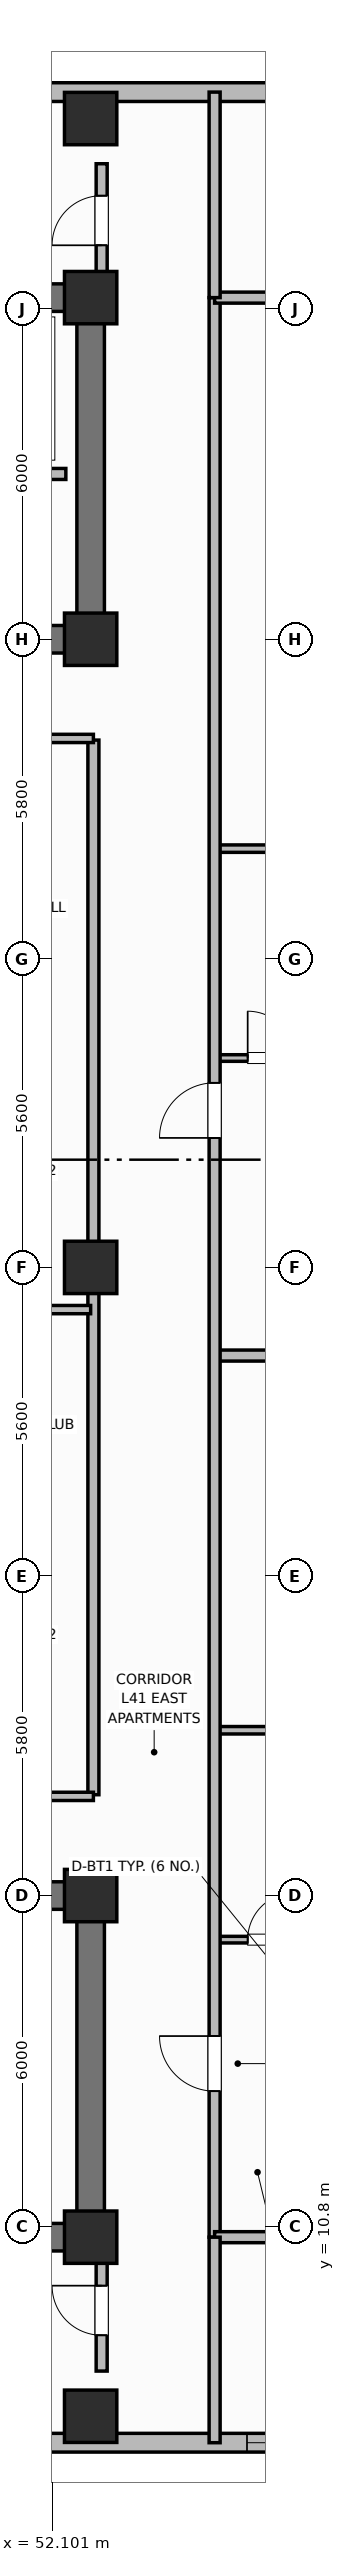
"""IFC4 building model, lengths in metres.
Left out: names, types, materials, properties, quantities, classifications, styles, units other than length and angle.
Written with IfcOpenShell. Run it as: python <this file> out.ifc"""

import sys

from ifc_helpers import new_model, si_unit, direction, frame, frame_2d, origin, origin_2d, place, context, subcontext, project, spatial, rectangle, extrude, element, fill, save


model = new_model("IFC4")
c1 = context("Model", 3, precision=1e-05, world=origin(), true_north=direction((0.0, 1.0)))
c2 = subcontext(c1, "Body", "Model", "MODEL_VIEW")
j1 = project(units=[si_unit("LENGTHUNIT", "METRE"), si_unit("PLANEANGLEUNIT", "RADIAN")], contexts=[c1])
p1 = place(None, origin())
s1 = spatial("IfcSite", under=j1, at=p1, CompositionType="ELEMENT")
p2 = place(p1, origin())
s2 = spatial("IfcBuilding", under=s1, at=p2, CompositionType="ELEMENT")
p3 = place(p2, frame((0.0, 0.0, 166.3)))
s3 = spatial("IfcBuildingStorey", under=s2, at=p3, CompositionType="ELEMENT", Elevation=166.3)
p4 = place(p3, frame((52.8, 10.6, 0.0), z_axis=(0.0, 0.0, 1.0), x_axis=(-1.0, 0.0, 0.0)))
e1 = element("IfcWall", 1, at=p4, inside=s3, PredefinedType="SHEAR", context=c2, shape_type="SweptSolid", body=[
    extrude(rectangle(XDim=27.2, YDim=0.5, at=frame_2d((13.6, 0.0))), origin(), (0.0, 0.0, 1.0), 3.7),
])
p5 = place(p3, frame((52.8, 10.85, 0.0), z_axis=(0.0, 0.0, 1.0), x_axis=(0.0, 1.0, 0.0)))
e2 = element("IfcWall", 2, at=p5, inside=s3, PredefinedType="SHEAR", context=c2, shape_type="SweptSolid", body=[
    extrude(rectangle(XDim=5.7, YDim=0.5, at=frame_2d((2.85, 0.0))), origin(), (0.0, 0.0, 1.0), 3.7),
])
p6 = place(p3, frame((25.6, 16.8, 0.0), z_axis=(0.0, 0.0, 1.0), x_axis=(1.0, 0.0, 0.0)))
e3 = element("IfcWall", 3, at=p6, inside=s3, PredefinedType="SHEAR", context=c2, shape_type="SweptSolid", body=[
    extrude(rectangle(XDim=27.2, YDim=0.5, at=frame_2d((13.6, 0.0))), origin(), (0.0, 0.0, 1.0), 3.7),
])
p7 = place(p6, frame((1.8, 0.0, 0.0)))
e4 = element("IfcOpeningElement", 4, at=p7, cuts=e3, PredefinedType="OPENING", context=c2, shape_type="SweptSolid", body=[
    extrude(rectangle(XDim=1.1, YDim=2.15, at=frame_2d((0.55, 1.075))), frame((0.0, 0.26, 0.0), z_axis=(0.0, -1.0, 0.0), x_axis=(1.0, 0.0, 0.0)), (0.0, 0.0, 1.0), 0.52),
])
p8 = place(p6, frame((5.6, 0.0, 0.0)))
e5 = element("IfcOpeningElement", 5, at=p8, cuts=e3, PredefinedType="OPENING", context=c2, shape_type="SweptSolid", body=[
    extrude(rectangle(XDim=0.85, YDim=2.1, at=frame_2d((0.425, 1.05))), frame((0.0, 0.26, 0.0), z_axis=(0.0, -1.0, 0.0), x_axis=(1.0, 0.0, 0.0)), (0.0, 0.0, 1.0), 0.52),
])
p9 = place(p6, frame((13.0, 0.0, 0.0)))
e6 = element("IfcOpeningElement", 6, at=p9, cuts=e3, PredefinedType="OPENING", context=c2, shape_type="SweptSolid", body=[
    extrude(rectangle(XDim=1.2, YDim=2.15, at=frame_2d((0.6, 1.075))), frame((0.0, 0.26, 0.0), z_axis=(0.0, -1.0, 0.0), x_axis=(1.0, 0.0, 0.0)), (0.0, 0.0, 1.0), 0.52),
])
p10 = place(p6, frame((19.2, 0.0, 0.0)))
e7 = element("IfcOpeningElement", 7, at=p10, cuts=e3, PredefinedType="OPENING", context=c2, shape_type="SweptSolid", body=[
    extrude(rectangle(XDim=0.85, YDim=2.1, at=frame_2d((0.425, 1.05))), frame((0.0, 0.26, 0.0), z_axis=(0.0, -1.0, 0.0), x_axis=(1.0, 0.0, 0.0)), (0.0, 0.0, 1.0), 0.52),
])
p11 = place(p6, frame((23.8, 0.0, 0.0)))
e8 = element("IfcOpeningElement", 8, at=p11, cuts=e3, PredefinedType="OPENING", context=c2, shape_type="SweptSolid", body=[
    extrude(rectangle(XDim=0.9, YDim=2.1, at=frame_2d((0.45, 1.05))), frame((0.0, 0.26, 0.0), z_axis=(0.0, -1.0, 0.0), x_axis=(1.0, 0.0, 0.0)), (0.0, 0.0, 1.0), 0.52),
])
p12 = place(p3, frame((25.6, 45.8, 0.0), z_axis=(0.0, 0.0, 1.0), x_axis=(1.0, 0.0, 0.0)))
e9 = element("IfcWall", 9, at=p12, inside=s3, PredefinedType="SHEAR", context=c2, shape_type="SweptSolid", body=[
    extrude(rectangle(XDim=27.2, YDim=0.5, at=frame_2d((13.6, 0.0))), origin(), (0.0, 0.0, 1.0), 3.7),
])
p13 = place(p3, frame((52.8, 39.85, 0.0), z_axis=(0.0, 0.0, 1.0), x_axis=(0.0, 1.0, 0.0)))
e10 = element("IfcWall", 10, at=p13, inside=s3, PredefinedType="SHEAR", context=c2, shape_type="SweptSolid", body=[
    extrude(rectangle(XDim=5.7, YDim=0.5, at=frame_2d((2.85, 0.0))), origin(), (0.0, 0.0, 1.0), 3.7),
])
p14 = place(p3, frame((52.8, 39.6, 0.0), z_axis=(0.0, 0.0, 1.0), x_axis=(-1.0, 0.0, 0.0)))
e11 = element("IfcWall", 11, at=p14, inside=s3, PredefinedType="SHEAR", context=c2, shape_type="SweptSolid", body=[
    extrude(rectangle(XDim=27.2, YDim=0.5, at=frame_2d((13.6, 0.0))), origin(), (0.0, 0.0, 1.0), 3.7),
])
p15 = place(p14, frame((24.2, 0.0, 0.0)))
e12 = element("IfcOpeningElement", 12, at=p15, cuts=e11, PredefinedType="OPENING", context=c2, shape_type="SweptSolid", body=[
    extrude(rectangle(XDim=1.1, YDim=2.15, at=frame_2d((0.55, 1.075))), frame((0.0, 0.26, 0.0), z_axis=(0.0, -1.0, 0.0), x_axis=(1.0, 0.0, 0.0)), (0.0, 0.0, 1.0), 0.52),
])
p16 = place(p14, frame((20.55, 0.0, 0.0)))
e13 = element("IfcOpeningElement", 13, at=p16, cuts=e11, PredefinedType="OPENING", context=c2, shape_type="SweptSolid", body=[
    extrude(rectangle(XDim=0.95, YDim=2.1, at=frame_2d((0.475, 1.05))), frame((0.0, 0.26, 0.0), z_axis=(0.0, -1.0, 0.0), x_axis=(1.0, 0.0, 0.0)), (0.0, 0.0, 1.0), 0.52),
])
p17 = place(p14, frame((15.1, 0.0, 0.0)))
e14 = element("IfcOpeningElement", 14, at=p17, cuts=e11, PredefinedType="OPENING", context=c2, shape_type="SweptSolid", body=[
    extrude(rectangle(XDim=1.2, YDim=2.15, at=frame_2d((0.6, 1.075))), frame((0.0, 0.26, 0.0), z_axis=(0.0, -1.0, 0.0), x_axis=(1.0, 0.0, 0.0)), (0.0, 0.0, 1.0), 0.52),
])
p18 = place(p14, frame((13.05, 0.0, 0.0)))
e15 = element("IfcOpeningElement", 15, at=p18, cuts=e11, PredefinedType="OPENING", context=c2, shape_type="SweptSolid", body=[
    extrude(rectangle(XDim=0.85, YDim=2.1, at=frame_2d((0.425, 1.05))), frame((0.0, 0.26, 0.0), z_axis=(0.0, -1.0, 0.0), x_axis=(1.0, 0.0, 0.0)), (0.0, 0.0, 1.0), 0.52),
])
p19 = place(p14, frame((11.0, 0.0, 0.0)))
e16 = element("IfcOpeningElement", 16, at=p19, cuts=e11, PredefinedType="OPENING", context=c2, shape_type="SweptSolid", body=[
    extrude(rectangle(XDim=0.85, YDim=2.1, at=frame_2d((0.425, 1.05))), frame((0.0, 0.26, 0.0), z_axis=(0.0, -1.0, 0.0), x_axis=(1.0, 0.0, 0.0)), (0.0, 0.0, 1.0), 0.52),
])
p20 = place(p14, frame((7.35, 0.0, 0.0)))
e17 = element("IfcOpeningElement", 17, at=p20, cuts=e11, PredefinedType="OPENING", context=c2, shape_type="SweptSolid", body=[
    extrude(rectangle(XDim=0.85, YDim=2.1, at=frame_2d((0.425, 1.05))), frame((0.0, 0.26, 0.0), z_axis=(0.0, -1.0, 0.0), x_axis=(1.0, 0.0, 0.0)), (0.0, 0.0, 1.0), 0.52),
])
p21 = place(p14, frame((4.8, 0.0, 0.0)))
e18 = element("IfcOpeningElement", 18, at=p21, cuts=e11, PredefinedType="OPENING", context=c2, shape_type="SweptSolid", body=[
    extrude(rectangle(XDim=0.85, YDim=2.1, at=frame_2d((0.425, 1.05))), frame((0.0, 0.26, 0.0), z_axis=(0.0, -1.0, 0.0), x_axis=(1.0, 0.0, 0.0)), (0.0, 0.0, 1.0), 0.52),
])
p22 = place(p14, frame((1.9, 0.0, 0.0)))
e19 = element("IfcOpeningElement", 19, at=p22, cuts=e11, PredefinedType="OPENING", context=c2, shape_type="SweptSolid", body=[
    extrude(rectangle(XDim=0.85, YDim=2.1, at=frame_2d((0.425, 1.05))), frame((0.0, 0.26, 0.0), z_axis=(0.0, -1.0, 0.0), x_axis=(1.0, 0.0, 0.0)), (0.0, 0.0, 1.0), 0.52),
])
for number, where, z_axis, x_axis in (
    (20, (52.8, 10.6, 0.0), (0.0, 0.0, 1.0), (1.0, 0.0, 0.0)),
    (21, (52.8, 16.8, 0.0), (0.0, 0.0, 1.0), (1.0, 0.0, 0.0)),
    (22, (52.8, 39.6, 0.0), (0.0, 0.0, 1.0), (1.0, 0.0, 0.0)),
    (23, (52.8, 45.8, 0.0), (0.0, 0.0, 1.0), (1.0, 0.0, 0.0)),
    (24, (52.8, 28.2, 0.0), (0.0, 0.0, 1.0), (1.0, 0.0, 0.0)),
    (25, (52.8, 7.35, 0.0), (0.0, 0.0, 1.0), (1.0, 0.0, 0.0)),
    (26, (52.8, 49.05, 0.0), (0.0, 0.0, 1.0), (1.0, 0.0, 0.0)),
):
    element("IfcColumn", number, at=place(p3, frame(where, z_axis=z_axis, x_axis=x_axis)), inside=s3, PredefinedType="COLUMN", context=c2, shape_type="SweptSolid", body=[
        extrude(rectangle(XDim=0.95, YDim=0.95, at=origin_2d()), origin(), (0.0, 0.0, 1.0), 3.7),
    ])
p23 = place(p3, frame((42.4, 6.87, 0.0), z_axis=(0.0, 0.0, 1.0), x_axis=(1.0, 0.0, 0.0)))
e27 = element("IfcWall", 27, at=p23, inside=s3, PredefinedType="SOLIDWALL", context=c2, shape_type="SweptSolid", body=[
    extrude(rectangle(XDim=15.8, YDim=0.34, at=frame_2d((7.9, 0.0))), origin(), (0.0, 0.0, 1.0), 2.72),
])
p24 = place(p23, frame((5.288, 0.0, 0.7)))
e28 = element("IfcOpeningElement", 28, at=p24, cuts=e27, PredefinedType="OPENING", context=c2, shape_type="SweptSolid", body=[
    extrude(rectangle(XDim=1.6, YDim=1.9, at=frame_2d((0.8, 0.95))), frame((0.0, 0.18, 0.0), z_axis=(0.0, -1.0, 0.0), x_axis=(1.0, 0.0, 0.0)), (0.0, 0.0, 1.0), 0.36),
])
p25 = place(p23, frame((13.238, 0.0, 0.7)))
e29 = element("IfcOpeningElement", 29, at=p25, cuts=e27, PredefinedType="OPENING", context=c2, shape_type="SweptSolid", body=[
    extrude(rectangle(XDim=1.6, YDim=1.9, at=frame_2d((0.8, 0.95))), frame((0.0, 0.18, 0.0), z_axis=(0.0, -1.0, 0.0), x_axis=(1.0, 0.0, 0.0)), (0.0, 0.0, 1.0), 0.36),
])
p26 = place(p3, frame((58.2, 49.53, 0.0), z_axis=(0.0, 0.0, 1.0), x_axis=(-1.0, 0.0, 0.0)))
e30 = element("IfcWall", 30, at=p26, inside=s3, PredefinedType="SOLIDWALL", context=c2, shape_type="SweptSolid", body=[
    extrude(rectangle(XDim=15.8, YDim=0.34, at=frame_2d((7.9, 0.0))), origin(), (0.0, 0.0, 1.0), 2.72),
])
p27 = place(p26, frame((8.663, 0.0, 0.7)))
e31 = element("IfcOpeningElement", 31, at=p27, cuts=e30, PredefinedType="OPENING", context=c2, shape_type="SweptSolid", body=[
    extrude(rectangle(XDim=2.1, YDim=1.9, at=frame_2d((1.05, 0.95))), frame((0.0, 0.18, 0.0), z_axis=(0.0, -1.0, 0.0), x_axis=(1.0, 0.0, 0.0)), (0.0, 0.0, 1.0), 0.36),
])
p28 = place(p3, frame((52.35, 42.6, 0.0), z_axis=(0.0, 0.0, 1.0), x_axis=(-1.0, 0.0, 0.0)))
e32 = element("IfcWall", 32, at=p28, inside=s3, PredefinedType="PARTITIONING", context=c2, shape_type="SweptSolid", body=[
    extrude(rectangle(XDim=6.5, YDim=0.2, at=frame_2d((3.25, 0.0))), origin(), (0.0, 0.0, 1.0), 2.55),
])
p29 = place(p3, frame((52.85, 18.63, 0.0), z_axis=(0.0, 0.0, 1.0), x_axis=(0.0, 1.0, 0.0)))
e33 = element("IfcWall", 33, at=p29, inside=s3, PredefinedType="PARTITIONING", context=c2, shape_type="SweptSolid", body=[
    extrude(rectangle(XDim=19.14, YDim=0.2, at=frame_2d((9.57, 0.0))), origin(), (0.0, 0.0, 1.0), 2.55),
])
for number, where, z_axis, x_axis in (
    (34, (50.05, 18.6, 0.0), (0.0, 0.0, 1.0), (1.0, 0.0, 0.0)),
    (35, (50.05, 37.8, 0.0), (0.0, 0.0, 1.0), (1.0, 0.0, 0.0)),
):
    element("IfcWall", number, at=place(p3, frame(where, z_axis=z_axis, x_axis=x_axis)), inside=s3, PredefinedType="PARTITIONING", context=c2, shape_type="SweptSolid", body=[
        extrude(rectangle(XDim=2.8, YDim=0.15, at=frame_2d((1.4, 0.0))), origin(), (0.0, 0.0, 1.0), 2.55),
    ])
p30 = place(p3, frame((50.08, 27.434, 0.0), z_axis=(0.0, 0.0, 1.0), x_axis=(1.0, 0.0, 0.0)))
e36 = element("IfcWall", 36, at=p30, inside=s3, PredefinedType="PARTITIONING", context=c2, shape_type="SweptSolid", body=[
    extrude(rectangle(XDim=2.72, YDim=0.15, at=frame_2d((1.36, 0.0))), origin(), (0.0, 0.0, 1.0), 2.55),
])
p31 = place(p3, frame((55.05, 16.0, 0.0), z_axis=(0.0, 0.0, 1.0), x_axis=(1.0, 0.0, 0.0)))
e37 = element("IfcWall", 37, at=p31, inside=s3, PredefinedType="PARTITIONING", context=c2, shape_type="SweptSolid", body=[
    extrude(rectangle(XDim=2.25, YDim=0.12, at=frame_2d((1.125, 0.0))), origin(), (0.0, 0.0, 1.0), 2.55),
])
p32 = place(p31, frame((0.6, 0.0, 0.0)))
e38 = element("IfcOpeningElement", 38, at=p32, cuts=e37, PredefinedType="OPENING", context=c2, shape_type="SweptSolid", body=[
    extrude(rectangle(XDim=0.85, YDim=2.1, at=frame_2d((0.425, 1.05))), frame((0.0, 0.07, 0.0), z_axis=(0.0, -1.0, 0.0), x_axis=(1.0, 0.0, 0.0)), (0.0, 0.0, 1.0), 0.14),
])
p33 = place(p3, frame((55.05, 19.8, 0.0), z_axis=(0.0, 0.0, 1.0), x_axis=(1.0, 0.0, 0.0)))
e39 = element("IfcWall", 39, at=p33, inside=s3, PredefinedType="PARTITIONING", context=c2, shape_type="SweptSolid", body=[
    extrude(rectangle(XDim=2.25, YDim=0.135, at=frame_2d((1.125, 0.0))), origin(), (0.0, 0.0, 1.0), 2.55),
])
p34 = place(p3, frame((55.05, 26.6, 0.0), z_axis=(0.0, 0.0, 1.0), x_axis=(1.0, 0.0, 0.0)))
e40 = element("IfcWall", 40, at=p34, inside=s3, PredefinedType="PARTITIONING", context=c2, shape_type="SweptSolid", body=[
    extrude(rectangle(XDim=6.066, YDim=0.2, at=frame_2d((3.033, 0.0))), origin(), (0.0, 0.0, 1.0), 2.55),
])
p35 = place(p3, frame((55.05, 32.0, 0.0), z_axis=(0.0, 0.0, 1.0), x_axis=(1.0, 0.0, 0.0)))
e41 = element("IfcWall", 41, at=p35, inside=s3, PredefinedType="PARTITIONING", context=c2, shape_type="SweptSolid", body=[
    extrude(rectangle(XDim=2.25, YDim=0.12, at=frame_2d((1.125, 0.0))), origin(), (0.0, 0.0, 1.0), 2.55),
])
p36 = place(p35, frame((0.6, 0.0, 0.0)))
e42 = element("IfcOpeningElement", 42, at=p36, cuts=e41, PredefinedType="OPENING", context=c2, shape_type="SweptSolid", body=[
    extrude(rectangle(XDim=0.85, YDim=2.1, at=frame_2d((0.425, 1.05))), frame((0.0, 0.07, 0.0), z_axis=(0.0, -1.0, 0.0), x_axis=(1.0, 0.0, 0.0)), (0.0, 0.0, 1.0), 0.14),
])
p37 = place(p3, frame((55.05, 35.8, 0.0), z_axis=(0.0, 0.0, 1.0), x_axis=(1.0, 0.0, 0.0)))
e43 = element("IfcWall", 43, at=p37, inside=s3, PredefinedType="PARTITIONING", context=c2, shape_type="SweptSolid", body=[
    extrude(rectangle(XDim=2.25, YDim=0.135, at=frame_2d((1.125, 0.0))), origin(), (0.0, 0.0, 1.0), 2.55),
])
p38 = place(p3, frame((55.05, 10.6, 0.0), z_axis=(0.0, 0.0, 1.0), x_axis=(0.0, 1.0, 0.0)))
e44 = element("IfcWall", 44, at=p38, inside=s3, PredefinedType="PARTITIONING", context=c2, shape_type="SweptSolid", body=[
    extrude(rectangle(XDim=35.2, YDim=0.2, at=frame_2d((17.6, 0.0))), origin(), (0.0, 0.0, 1.0), 2.55),
])
p39 = place(p38, frame((2.65, 0.0, 0.0)))
e45 = element("IfcOpeningElement", 45, at=p39, cuts=e44, PredefinedType="OPENING", context=c2, shape_type="SweptSolid", body=[
    extrude(rectangle(XDim=1.0, YDim=2.15, at=frame_2d((0.5, 1.075))), frame((0.0, 0.11, 0.0), z_axis=(0.0, -1.0, 0.0), x_axis=(1.0, 0.0, 0.0)), (0.0, 0.0, 1.0), 0.22),
])
p40 = place(p38, frame((19.95, 0.0, 0.0)))
e46 = element("IfcOpeningElement", 46, at=p40, cuts=e44, PredefinedType="OPENING", context=c2, shape_type="SweptSolid", body=[
    extrude(rectangle(XDim=1.0, YDim=2.15, at=frame_2d((0.5, 1.075))), frame((0.0, 0.11, 0.0), z_axis=(0.0, -1.0, 0.0), x_axis=(1.0, 0.0, 0.0)), (0.0, 0.0, 1.0), 0.22),
])
for number, where, z_axis, x_axis in (
    (47, (55.05, 10.6, 0.0), (0.0, 0.0, 1.0), (1.0, 0.0, 0.0)),
    (48, (55.05, 45.8, 0.0), (0.0, 0.0, 1.0), (1.0, 0.0, 0.0)),
):
    element("IfcWall", number, at=place(p3, frame(where, z_axis=z_axis, x_axis=x_axis)), inside=s3, PredefinedType="PARTITIONING", context=c2, shape_type="SweptSolid", body=[
        extrude(rectangle(XDim=6.36, YDim=0.2, at=frame_2d((3.18, 0.0))), origin(), (0.0, 0.0, 1.0), 2.55),
    ])
for number, where, z_axis, x_axis in (
    (49, (55.05, 6.87, 0.0), (0.0, 0.0, 1.0), (0.0, 1.0, 0.0)),
    (50, (55.05, 45.8, 0.0), (0.0, 0.0, 1.0), (0.0, 1.0, 0.0)),
):
    element("IfcWall", number, at=place(p3, frame(where, z_axis=z_axis, x_axis=x_axis)), inside=s3, PredefinedType="PARTITIONING", context=c2, shape_type="SweptSolid", body=[
        extrude(rectangle(XDim=3.73, YDim=0.2, at=frame_2d((1.865, 0.0))), origin(), (0.0, 0.0, 1.0), 2.55),
    ])
p41 = place(p3, frame((53.0, 8.17, 0.0), z_axis=(0.0, 0.0, 1.0), x_axis=(0.0, 1.0, 0.0)))
e51 = element("IfcWall", 51, at=p41, inside=s3, PredefinedType="PARTITIONING", context=c2, shape_type="SweptSolid", body=[
    extrude(rectangle(XDim=2.13, YDim=0.2, at=frame_2d((1.065, 0.0))), origin(), (0.0, 0.0, 1.0), 2.55),
])
p42 = place(p41, frame((0.65, 0.0, 0.0)))
e52 = element("IfcOpeningElement", 52, at=p42, cuts=e51, PredefinedType="OPENING", context=c2, shape_type="SweptSolid", body=[
    extrude(rectangle(XDim=0.9, YDim=2.1, at=frame_2d((0.45, 1.05))), frame((0.0, 0.11, 0.0), z_axis=(0.0, -1.0, 0.0), x_axis=(1.0, 0.0, 0.0)), (0.0, 0.0, 1.0), 0.22),
])
p43 = place(p3, frame((53.0, 46.1, 0.0), z_axis=(0.0, 0.0, 1.0), x_axis=(0.0, 1.0, 0.0)))
e53 = element("IfcWall", 53, at=p43, inside=s3, PredefinedType="PARTITIONING", context=c2, shape_type="SweptSolid", body=[
    extrude(rectangle(XDim=2.13, YDim=0.2, at=frame_2d((1.065, 0.0))), origin(), (0.0, 0.0, 1.0), 2.55),
])
p44 = place(p43, frame((0.65, 0.0, 0.0)))
e54 = element("IfcOpeningElement", 54, at=p44, cuts=e53, PredefinedType="OPENING", context=c2, shape_type="SweptSolid", body=[
    extrude(rectangle(XDim=0.9, YDim=2.1, at=frame_2d((0.45, 1.05))), frame((0.0, 0.11, 0.0), z_axis=(0.0, -1.0, 0.0), x_axis=(1.0, 0.0, 0.0)), (0.0, 0.0, 1.0), 0.22),
])
p45 = place(p25, origin())
e55 = element("IfcWindow", 55, at=p45, inside=s3, PartitioningType="SINGLE_PANEL", PredefinedType="WINDOW", context=c2, shape_type="SweptSolid", body=[
    extrude(rectangle(XDim=1.6, YDim=1.9, at=frame_2d((0.8, 0.95))), frame((0.0, 0.03, 0.0), z_axis=(0.0, -1.0, 0.0), x_axis=(1.0, 0.0, 0.0)), (0.0, 0.0, 1.0), 0.06),
])
fill(e29, e55)
p46 = place(p32, origin())
e56 = element("IfcDoor", 56, at=p46, inside=s3, OperationType="SINGLE_SWING_RIGHT", PredefinedType="DOOR", context=c2, shape_type="SweptSolid", body=[
    extrude(rectangle(XDim=0.85, YDim=2.1, at=frame_2d((0.425, 1.05))), frame((0.0, 0.025, 0.0), z_axis=(0.0, -1.0, 0.0), x_axis=(1.0, 0.0, 0.0)), (0.0, 0.0, 1.0), 0.05),
])
fill(e38, e56)
p47 = place(p36, origin())
e57 = element("IfcDoor", 57, at=p47, inside=s3, OperationType="SINGLE_SWING_LEFT", PredefinedType="DOOR", context=c2, shape_type="SweptSolid", body=[
    extrude(rectangle(XDim=0.85, YDim=2.1, at=frame_2d((0.425, 1.05))), frame((0.0, 0.025, 0.0), z_axis=(0.0, -1.0, 0.0), x_axis=(1.0, 0.0, 0.0)), (0.0, 0.0, 1.0), 0.05),
])
fill(e42, e57)
p48 = place(p39, origin())
e58 = element("IfcDoor", 58, at=p48, inside=s3, OperationType="SINGLE_SWING_RIGHT", PredefinedType="DOOR", context=c2, shape_type="SweptSolid", body=[
    extrude(rectangle(XDim=1.0, YDim=2.15, at=frame_2d((0.5, 1.075))), frame((0.0, 0.025, 0.0), z_axis=(0.0, -1.0, 0.0), x_axis=(1.0, 0.0, 0.0)), (0.0, 0.0, 1.0), 0.05),
])
fill(e45, e58)
p49 = place(p40, origin())
e59 = element("IfcDoor", 59, at=p49, inside=s3, OperationType="SINGLE_SWING_LEFT", PredefinedType="DOOR", context=c2, shape_type="SweptSolid", body=[
    extrude(rectangle(XDim=1.0, YDim=2.15, at=frame_2d((0.5, 1.075))), frame((0.0, 0.025, 0.0), z_axis=(0.0, -1.0, 0.0), x_axis=(1.0, 0.0, 0.0)), (0.0, 0.0, 1.0), 0.05),
])
fill(e46, e59)
p50 = place(p42, origin())
e60 = element("IfcDoor", 60, at=p50, inside=s3, OperationType="SINGLE_SWING_RIGHT", PredefinedType="DOOR", context=c2, shape_type="SweptSolid", body=[
    extrude(rectangle(XDim=0.9, YDim=2.1, at=frame_2d((0.45, 1.05))), frame((0.0, 0.025, 0.0), z_axis=(0.0, -1.0, 0.0), x_axis=(1.0, 0.0, 0.0)), (0.0, 0.0, 1.0), 0.05),
])
fill(e52, e60)
p51 = place(p44, origin())
e61 = element("IfcDoor", 61, at=p51, inside=s3, OperationType="SINGLE_SWING_LEFT", PredefinedType="DOOR", context=c2, shape_type="SweptSolid", body=[
    extrude(rectangle(XDim=0.9, YDim=2.1, at=frame_2d((0.45, 1.05))), frame((0.0, 0.025, 0.0), z_axis=(0.0, -1.0, 0.0), x_axis=(1.0, 0.0, 0.0)), (0.0, 0.0, 1.0), 0.05),
])
fill(e54, e61)
save(model, sys.argv[1])
